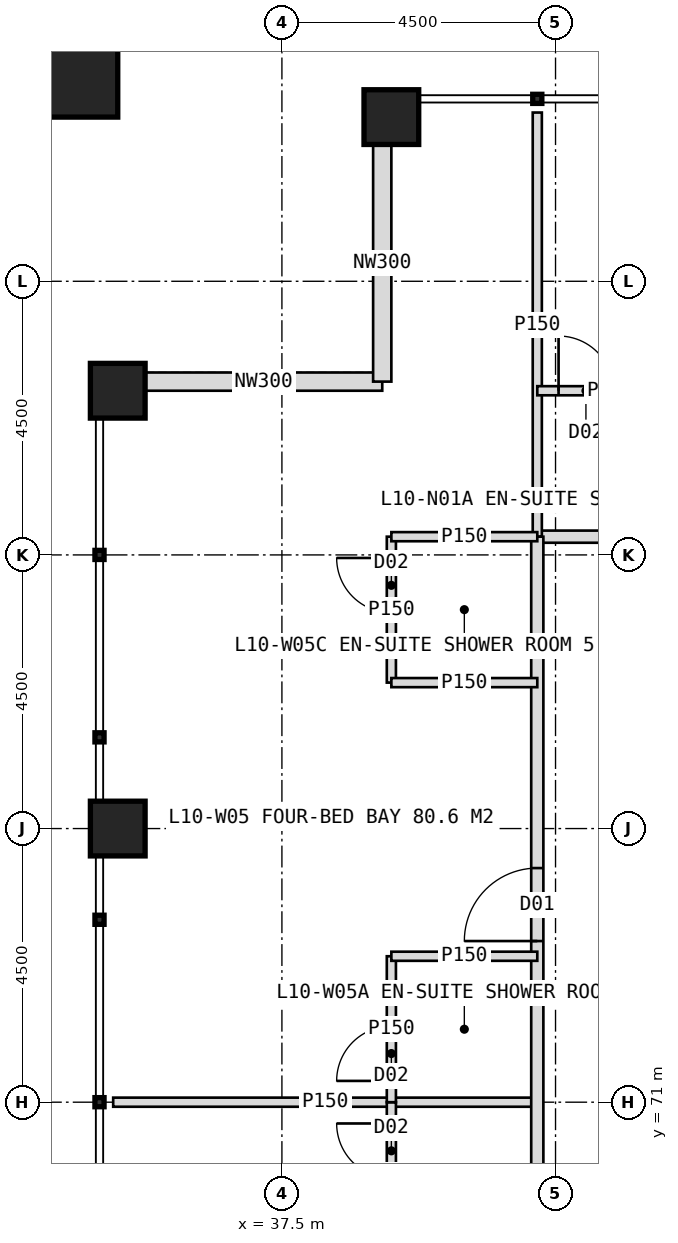
"""IFC4 building model, lengths in metres.
Left out: names, types, materials, properties, quantities, classifications, styles, units other than length and angle.
Written with IfcOpenShell. Run it as: python <this file> out.ifc"""

import sys

from ifc_helpers import new_model, si_unit, direction, frame, frame_2d, origin, origin_2d, place, context, subcontext, project, spatial, rectangle, hollow_rectangle, extrude, element, fill, save


model = new_model("IFC4")
c1 = context("Model", 3, precision=1e-05, world=origin(), true_north=direction((0.0, 1.0)))
c2 = subcontext(c1, "Body", "Model", "MODEL_VIEW")
j1 = project(units=[si_unit("LENGTHUNIT", "METRE"), si_unit("PLANEANGLEUNIT", "RADIAN")], contexts=[c1])
p1 = place(None, origin())
s1 = spatial("IfcSite", under=j1, at=p1, CompositionType="ELEMENT")
p2 = place(p1, origin())
s2 = spatial("IfcBuilding", under=s1, at=p2, CompositionType="ELEMENT")
p3 = place(p2, frame((0.0, 0.0, 47.0)))
s3 = spatial("IfcBuildingStorey", under=s2, at=p3, CompositionType="ELEMENT", Elevation=47.0)
for number, where, z_axis, x_axis in (
    (1, (39.3, 87.2, 0.0), (0.0, 0.0, 1.0), (1.0, 0.0, 0.0)),
    (2, (34.8, 75.5, 0.0), (0.0, 0.0, 1.0), (1.0, 0.0, 0.0)),
    (3, (34.8, 82.7, 0.0), (0.0, 0.0, 1.0), (1.0, 0.0, 0.0)),
):
    element("IfcColumn", number, at=place(p3, frame(where, z_axis=z_axis, x_axis=x_axis)), inside=s3, PredefinedType="COLUMN", context=c2, shape_type="SweptSolid", body=[
        extrude(hollow_rectangle(XDim=0.9, YDim=0.9, WallThickness=0.08, at=origin_2d()), origin(), (0.0, 0.0, 1.0), 4.0),
    ])
p4 = place(p3, frame((33.9, 88.1, 0.0), z_axis=(0.0, 0.0, 1.0), x_axis=(1.0, 0.0, 0.0)))
e4 = element("IfcColumn", 4, at=p4, inside=s3, PredefinedType="COLUMN", context=c2, shape_type="SweptSolid", body=[
    extrude(hollow_rectangle(XDim=1.8, YDim=1.8, WallThickness=0.1, at=origin_2d()), origin(), (0.0, 0.0, 1.0), 4.0),
])
for number, where, z_axis, x_axis in (
    (5, (35.25, 82.85, 0.0), (0.0, 0.0, 1.0), (1.0, 0.0, 0.0)),
    (6, (39.15, 82.85, 0.0), (0.0, 0.0, 1.0), (0.0, 1.0, 0.0)),
):
    element("IfcWall", number, at=place(p3, frame(where, z_axis=z_axis, x_axis=x_axis)), inside=s3, PredefinedType="ELEMENTEDWALL", context=c2, shape_type="SweptSolid", body=[
        extrude(rectangle(XDim=3.9, YDim=0.3, at=frame_2d((1.95, 0.0))), origin(), (0.0, 0.0, 1.0), 2.95),
    ])
p5 = place(p3, frame((41.7, 80.3, 0.0), z_axis=(0.0, 0.0, 1.0), x_axis=(1.0, 0.0, 0.0)))
e7 = element("IfcWall", 7, at=p5, inside=s3, PredefinedType="PARTITIONING", context=c2, shape_type="SweptSolid", body=[
    extrude(rectangle(XDim=36.6, YDim=0.2, at=frame_2d((18.3, 0.0))), origin(), (0.0, 0.0, 1.0), 3.75),
])
p6 = place(p5, frame((2.65, 0.0, 0.0)))
e8 = element("IfcOpeningElement", 8, at=p6, cuts=e7, PredefinedType="OPENING", context=c2, shape_type="SweptSolid", body=[
    extrude(rectangle(XDim=1.2, YDim=2.2, at=frame_2d((0.6, 1.1))), frame((0.0, 0.11, 0.0), z_axis=(0.0, -1.0, 0.0), x_axis=(1.0, 0.0, 0.0)), (0.0, 0.0, 1.0), 0.22),
])
p7 = place(p5, frame((11.95, 0.0, 0.0)))
e9 = element("IfcOpeningElement", 9, at=p7, cuts=e7, PredefinedType="OPENING", context=c2, shape_type="SweptSolid", body=[
    extrude(rectangle(XDim=1.2, YDim=2.2, at=frame_2d((0.6, 1.1))), frame((0.0, 0.11, 0.0), z_axis=(0.0, -1.0, 0.0), x_axis=(1.0, 0.0, 0.0)), (0.0, 0.0, 1.0), 0.22),
])
p8 = place(p5, frame((20.8, 0.0, 0.0)))
e10 = element("IfcOpeningElement", 10, at=p8, cuts=e7, PredefinedType="OPENING", context=c2, shape_type="SweptSolid", body=[
    extrude(rectangle(XDim=1.0, YDim=2.1, at=frame_2d((0.5, 1.05))), frame((0.0, 0.11, 0.0), z_axis=(0.0, -1.0, 0.0), x_axis=(1.0, 0.0, 0.0)), (0.0, 0.0, 1.0), 0.22),
])
p9 = place(p5, frame((26.95, 0.0, 0.0)))
e11 = element("IfcOpeningElement", 11, at=p9, cuts=e7, PredefinedType="OPENING", context=c2, shape_type="SweptSolid", body=[
    extrude(rectangle(XDim=1.2, YDim=2.2, at=frame_2d((0.6, 1.1))), frame((0.0, 0.11, 0.0), z_axis=(0.0, -1.0, 0.0), x_axis=(1.0, 0.0, 0.0)), (0.0, 0.0, 1.0), 0.22),
])
p10 = place(p3, frame((41.7, 80.3, 0.0), z_axis=(0.0, 0.0, 1.0), x_axis=(0.0, 1.0, 0.0)))
e12 = element("IfcWall", 12, at=p10, inside=s3, PredefinedType="PARTITIONING", context=c2, shape_type="SweptSolid", body=[
    extrude(rectangle(XDim=6.975, YDim=0.15, at=frame_2d((3.487, 0.0))), origin(), (0.0, 0.0, 1.0), 3.75),
])
p11 = place(p3, frame((41.7, 82.7, 0.0), z_axis=(0.0, 0.0, 1.0), x_axis=(1.0, 0.0, 0.0)))
e13 = element("IfcWall", 13, at=p11, inside=s3, PredefinedType="PARTITIONING", context=c2, shape_type="SweptSolid", body=[
    extrude(rectangle(XDim=2.4, YDim=0.15, at=frame_2d((1.2, 0.0))), origin(), (0.0, 0.0, 1.0), 2.95),
])
p12 = place(p11, frame((0.35, 0.0, 0.0)))
e14 = element("IfcOpeningElement", 14, at=p12, cuts=e13, PredefinedType="OPENING", context=c2, shape_type="SweptSolid", body=[
    extrude(rectangle(XDim=0.9, YDim=2.1, at=frame_2d((0.45, 1.05))), frame((0.0, 0.085, 0.0), z_axis=(0.0, -1.0, 0.0), x_axis=(1.0, 0.0, 0.0)), (0.0, 0.0, 1.0), 0.17),
])
p13 = place(p3, frame((41.7, 71.0, 0.0), z_axis=(0.0, 0.0, 1.0), x_axis=(-1.0, 0.0, 0.0)))
e15 = element("IfcWall", 15, at=p13, inside=s3, PredefinedType="PARTITIONING", context=c2, shape_type="SweptSolid", body=[
    extrude(rectangle(XDim=6.975, YDim=0.15, at=frame_2d((3.487, 0.0))), origin(), (0.0, 0.0, 1.0), 3.75),
])
p14 = place(p3, frame((41.7, 43.7, 0.0), z_axis=(0.0, 0.0, 1.0), x_axis=(0.0, 1.0, 0.0)))
e16 = element("IfcWall", 16, at=p14, inside=s3, PredefinedType="PARTITIONING", context=c2, shape_type="SweptSolid", body=[
    extrude(rectangle(XDim=36.6, YDim=0.2, at=frame_2d((18.3, 0.0))), origin(), (0.0, 0.0, 1.0), 3.75),
])
p15 = place(p14, frame((2.65, 0.0, 0.0)))
e17 = element("IfcOpeningElement", 17, at=p15, cuts=e16, PredefinedType="OPENING", context=c2, shape_type="SweptSolid", body=[
    extrude(rectangle(XDim=1.2, YDim=2.2, at=frame_2d((0.6, 1.1))), frame((0.0, 0.11, 0.0), z_axis=(0.0, -1.0, 0.0), x_axis=(1.0, 0.0, 0.0)), (0.0, 0.0, 1.0), 0.22),
])
p16 = place(p14, frame((8.95, 0.0, 0.0)))
e18 = element("IfcOpeningElement", 18, at=p16, cuts=e16, PredefinedType="OPENING", context=c2, shape_type="SweptSolid", body=[
    extrude(rectangle(XDim=1.2, YDim=2.2, at=frame_2d((0.6, 1.1))), frame((0.0, 0.11, 0.0), z_axis=(0.0, -1.0, 0.0), x_axis=(1.0, 0.0, 0.0)), (0.0, 0.0, 1.0), 0.22),
])
p17 = place(p14, frame((14.95, 0.0, 0.0)))
e19 = element("IfcOpeningElement", 19, at=p17, cuts=e16, PredefinedType="OPENING", context=c2, shape_type="SweptSolid", body=[
    extrude(rectangle(XDim=1.2, YDim=2.2, at=frame_2d((0.6, 1.1))), frame((0.0, 0.11, 0.0), z_axis=(0.0, -1.0, 0.0), x_axis=(1.0, 0.0, 0.0)), (0.0, 0.0, 1.0), 0.22),
])
p18 = place(p14, frame((20.95, 0.0, 0.0)))
e20 = element("IfcOpeningElement", 20, at=p18, cuts=e16, PredefinedType="OPENING", context=c2, shape_type="SweptSolid", body=[
    extrude(rectangle(XDim=1.2, YDim=2.2, at=frame_2d((0.6, 1.1))), frame((0.0, 0.11, 0.0), z_axis=(0.0, -1.0, 0.0), x_axis=(1.0, 0.0, 0.0)), (0.0, 0.0, 1.0), 0.22),
])
p19 = place(p14, frame((29.95, 0.0, 0.0)))
e21 = element("IfcOpeningElement", 21, at=p19, cuts=e16, PredefinedType="OPENING", context=c2, shape_type="SweptSolid", body=[
    extrude(rectangle(XDim=1.2, YDim=2.2, at=frame_2d((0.6, 1.1))), frame((0.0, 0.11, 0.0), z_axis=(0.0, -1.0, 0.0), x_axis=(1.0, 0.0, 0.0)), (0.0, 0.0, 1.0), 0.22),
])
p20 = place(p3, frame((39.3, 68.6, 0.0), z_axis=(0.0, 0.0, 1.0), x_axis=(0.0, 1.0, 0.0)))
e22 = element("IfcWall", 22, at=p20, inside=s3, PredefinedType="PARTITIONING", context=c2, shape_type="SweptSolid", body=[
    extrude(rectangle(XDim=2.4, YDim=0.15, at=frame_2d((1.2, 0.0))), origin(), (0.0, 0.0, 1.0), 3.75),
])
p21 = place(p20, frame((1.15, 0.0, 0.0)))
e23 = element("IfcOpeningElement", 23, at=p21, cuts=e22, PredefinedType="OPENING", context=c2, shape_type="SweptSolid", body=[
    extrude(rectangle(XDim=0.9, YDim=2.1, at=frame_2d((0.45, 1.05))), frame((0.0, 0.085, 0.0), z_axis=(0.0, -1.0, 0.0), x_axis=(1.0, 0.0, 0.0)), (0.0, 0.0, 1.0), 0.17),
])
p22 = place(p3, frame((39.3, 71.0, 0.0), z_axis=(0.0, 0.0, 1.0), x_axis=(0.0, 1.0, 0.0)))
e24 = element("IfcWall", 24, at=p22, inside=s3, PredefinedType="PARTITIONING", context=c2, shape_type="SweptSolid", body=[
    extrude(rectangle(XDim=2.4, YDim=0.15, at=frame_2d((1.2, 0.0))), origin(), (0.0, 0.0, 1.0), 3.75),
])
p23 = place(p22, frame((0.35, 0.0, 0.0)))
e25 = element("IfcOpeningElement", 25, at=p23, cuts=e24, PredefinedType="OPENING", context=c2, shape_type="SweptSolid", body=[
    extrude(rectangle(XDim=0.9, YDim=2.1, at=frame_2d((0.45, 1.05))), frame((0.0, 0.085, 0.0), z_axis=(0.0, -1.0, 0.0), x_axis=(1.0, 0.0, 0.0)), (0.0, 0.0, 1.0), 0.17),
])
p24 = place(p3, frame((41.7, 73.4, 0.0), z_axis=(0.0, 0.0, 1.0), x_axis=(-1.0, 0.0, 0.0)))
e26 = element("IfcWall", 26, at=p24, inside=s3, PredefinedType="PARTITIONING", context=c2, shape_type="SweptSolid", body=[
    extrude(rectangle(XDim=2.4, YDim=0.15, at=frame_2d((1.2, 0.0))), origin(), (0.0, 0.0, 1.0), 3.75),
])
p25 = place(p3, frame((39.3, 77.9, 0.0), z_axis=(0.0, 0.0, 1.0), x_axis=(0.0, 1.0, 0.0)))
e27 = element("IfcWall", 27, at=p25, inside=s3, PredefinedType="PARTITIONING", context=c2, shape_type="SweptSolid", body=[
    extrude(rectangle(XDim=2.4, YDim=0.15, at=frame_2d((1.2, 0.0))), origin(), (0.0, 0.0, 1.0), 2.95),
])
p26 = place(p25, frame((1.15, 0.0, 0.0)))
e28 = element("IfcOpeningElement", 28, at=p26, cuts=e27, PredefinedType="OPENING", context=c2, shape_type="SweptSolid", body=[
    extrude(rectangle(XDim=0.9, YDim=2.1, at=frame_2d((0.45, 1.05))), frame((0.0, 0.085, 0.0), z_axis=(0.0, -1.0, 0.0), x_axis=(1.0, 0.0, 0.0)), (0.0, 0.0, 1.0), 0.17),
])
for number, where, z_axis, x_axis in (
    (29, (41.7, 77.9, 0.0), (0.0, 0.0, 1.0), (-1.0, 0.0, 0.0)),
    (30, (41.7, 80.3, 0.0), (0.0, 0.0, 1.0), (-1.0, 0.0, 0.0)),
):
    element("IfcWall", number, at=place(p3, frame(where, z_axis=z_axis, x_axis=x_axis)), inside=s3, PredefinedType="PARTITIONING", context=c2, shape_type="SweptSolid", body=[
        extrude(rectangle(XDim=2.4, YDim=0.15, at=frame_2d((1.2, 0.0))), origin(), (0.0, 0.0, 1.0), 3.75),
    ])
p27 = place(p12, origin())
e31 = element("IfcDoor", 31, at=p27, inside=s3, OperationType="SINGLE_SWING_LEFT", PredefinedType="DOOR", context=c2, shape_type="SweptSolid", body=[
    extrude(rectangle(XDim=0.9, YDim=2.1, at=frame_2d((0.45, 1.05))), frame((0.0, 0.025, 0.0), z_axis=(0.0, -1.0, 0.0), x_axis=(1.0, 0.0, 0.0)), (0.0, 0.0, 1.0), 0.05),
])
fill(e14, e31)
p28 = place(p21, origin())
e32 = element("IfcDoor", 32, at=p28, inside=s3, OperationType="SINGLE_SWING_RIGHT", PredefinedType="DOOR", context=c2, shape_type="SweptSolid", body=[
    extrude(rectangle(XDim=0.9, YDim=2.1, at=frame_2d((0.45, 1.05))), frame((0.0, 0.025, 0.0), z_axis=(0.0, -1.0, 0.0), x_axis=(1.0, 0.0, 0.0)), (0.0, 0.0, 1.0), 0.05),
])
fill(e23, e32)
p29 = place(p19, origin())
e33 = element("IfcDoor", 33, at=p29, inside=s3, OperationType="SINGLE_SWING_LEFT", PredefinedType="DOOR", context=c2, shape_type="SweptSolid", body=[
    extrude(rectangle(XDim=1.2, YDim=2.2, at=frame_2d((0.6, 1.1))), frame((0.0, 0.025, 0.0), z_axis=(0.0, -1.0, 0.0), x_axis=(1.0, 0.0, 0.0)), (0.0, 0.0, 1.0), 0.05),
])
fill(e21, e33)
p30 = place(p23, origin())
e34 = element("IfcDoor", 34, at=p30, inside=s3, OperationType="SINGLE_SWING_LEFT", PredefinedType="DOOR", context=c2, shape_type="SweptSolid", body=[
    extrude(rectangle(XDim=0.9, YDim=2.1, at=frame_2d((0.45, 1.05))), frame((0.0, 0.025, 0.0), z_axis=(0.0, -1.0, 0.0), x_axis=(1.0, 0.0, 0.0)), (0.0, 0.0, 1.0), 0.05),
])
fill(e25, e34)
p31 = place(p26, origin())
e35 = element("IfcDoor", 35, at=p31, inside=s3, OperationType="SINGLE_SWING_RIGHT", PredefinedType="DOOR", context=c2, shape_type="SweptSolid", body=[
    extrude(rectangle(XDim=0.9, YDim=2.1, at=frame_2d((0.45, 1.05))), frame((0.0, 0.025, 0.0), z_axis=(0.0, -1.0, 0.0), x_axis=(1.0, 0.0, 0.0)), (0.0, 0.0, 1.0), 0.05),
])
fill(e28, e35)
save(model, sys.argv[1])
